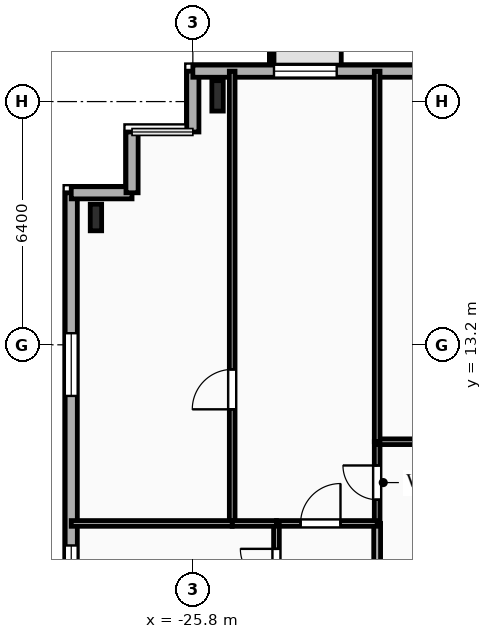
"""IFC4 building model, lengths in metres.
Left out: names, types, materials, properties, quantities, classifications, styles, units other than length and angle.
Written with IfcOpenShell. Run it as: python <this file> out.ifc"""

import sys

from ifc_helpers import new_model, si_unit, direction, frame, frame_2d, origin, origin_2d, place, context, subcontext, project, spatial, rectangle, i_section, extrude, element, fill, save


model = new_model("IFC4")
c1 = context("Model", 3, precision=1e-05, world=origin(), true_north=direction((0.0, 1.0)))
c2 = subcontext(c1, "Body", "Model", "MODEL_VIEW")
j1 = project(units=[si_unit("LENGTHUNIT", "METRE"), si_unit("PLANEANGLEUNIT", "RADIAN")], contexts=[c1])
p1 = place(None, origin())
s1 = spatial("IfcSite", under=j1, at=p1, CompositionType="ELEMENT")
p2 = place(p1, origin())
s2 = spatial("IfcBuilding", under=s1, at=p2, CompositionType="ELEMENT")
p3 = place(p2, frame((0.0, 0.0, 167.85)))
s3 = spatial("IfcBuildingStorey", under=s2, at=p3, CompositionType="ELEMENT", Elevation=167.85)
p4 = place(p3, frame((-25.15, 19.75, 0.0), z_axis=(0.0, 0.0, 1.0), x_axis=(1.0, 0.0, 0.0)))
e1 = element("IfcColumn", 1, at=p4, inside=s3, PredefinedType="COLUMN", context=c2, shape_type="SweptSolid", body=[
    extrude(i_section(OverallWidth=0.3, OverallDepth=0.8, WebThickness=0.018, FlangeThickness=0.033, FilletRadius=0.03, at=origin_2d()), origin(), (0.0, 0.0, 1.0), 3.35),
])
p5 = place(p3, frame((-28.35, 16.55, 0.0), z_axis=(0.0, 0.0, 1.0), x_axis=(1.0, 0.0, 0.0)))
e2 = element("IfcColumn", 2, at=p5, inside=s3, PredefinedType="COLUMN", context=c2, shape_type="SweptSolid", body=[
    extrude(i_section(OverallWidth=0.3, OverallDepth=0.7, WebThickness=0.017, FlangeThickness=0.032, FilletRadius=0.027, at=origin_2d()), origin(), (0.0, 0.0, 1.0), 3.35),
])
p6 = place(p3, frame((-29.0, -12.4, 0.0), z_axis=(0.0, 0.0, 1.0), x_axis=(0.0, 1.0, 0.0)))
e3 = element("IfcWall", 3, at=p6, inside=s3, PredefinedType="SOLIDWALL", context=c2, shape_type="SweptSolid", body=[
    extrude(rectangle(XDim=29.6, YDim=0.32, at=frame_2d((14.8, 0.0))), origin(), (0.0, 0.0, 1.0), 3.04),
])
p7 = place(p6, frame((2.855, 0.0, 0.85)))
e4 = element("IfcOpeningElement", 4, at=p7, cuts=e3, PredefinedType="OPENING", context=c2, shape_type="SweptSolid", body=[
    extrude(rectangle(XDim=1.65, YDim=1.85, at=frame_2d((0.825, 0.925))), frame((0.0, 0.17, 0.0), z_axis=(0.0, -1.0, 0.0), x_axis=(1.0, 0.0, 0.0)), (0.0, 0.0, 1.0), 0.34),
])
p8 = place(p6, frame((9.865, 0.0, 0.85)))
e5 = element("IfcOpeningElement", 5, at=p8, cuts=e3, PredefinedType="OPENING", context=c2, shape_type="SweptSolid", body=[
    extrude(rectangle(XDim=1.95, YDim=1.85, at=frame_2d((0.975, 0.925))), frame((0.0, 0.17, 0.0), z_axis=(0.0, -1.0, 0.0), x_axis=(1.0, 0.0, 0.0)), (0.0, 0.0, 1.0), 0.34),
])
p9 = place(p6, frame((13.08, 0.0, 0.85)))
e6 = element("IfcOpeningElement", 6, at=p9, cuts=e3, PredefinedType="OPENING", context=c2, shape_type="SweptSolid", body=[
    extrude(rectangle(XDim=1.6, YDim=1.85, at=frame_2d((0.8, 0.925))), frame((0.0, 0.17, 0.0), z_axis=(0.0, -1.0, 0.0), x_axis=(1.0, 0.0, 0.0)), (0.0, 0.0, 1.0), 0.34),
])
p10 = place(p6, frame((15.88, 0.0, 0.85)))
e7 = element("IfcOpeningElement", 7, at=p10, cuts=e3, PredefinedType="OPENING", context=c2, shape_type="SweptSolid", body=[
    extrude(rectangle(XDim=1.6, YDim=1.85, at=frame_2d((0.8, 0.925))), frame((0.0, 0.17, 0.0), z_axis=(0.0, -1.0, 0.0), x_axis=(1.0, 0.0, 0.0)), (0.0, 0.0, 1.0), 0.34),
])
p11 = place(p6, frame((18.72, 0.0, 0.85)))
e8 = element("IfcOpeningElement", 8, at=p11, cuts=e3, PredefinedType="OPENING", context=c2, shape_type="SweptSolid", body=[
    extrude(rectangle(XDim=1.6, YDim=1.85, at=frame_2d((0.8, 0.925))), frame((0.0, 0.17, 0.0), z_axis=(0.0, -1.0, 0.0), x_axis=(1.0, 0.0, 0.0)), (0.0, 0.0, 1.0), 0.34),
])
p12 = place(p6, frame((24.255, 0.0, 0.85)))
e9 = element("IfcOpeningElement", 9, at=p12, cuts=e3, PredefinedType="OPENING", context=c2, shape_type="SweptSolid", body=[
    extrude(rectangle(XDim=1.65, YDim=1.85, at=frame_2d((0.825, 0.925))), frame((0.0, 0.17, 0.0), z_axis=(0.0, -1.0, 0.0), x_axis=(1.0, 0.0, 0.0)), (0.0, 0.0, 1.0), 0.34),
])
for number, where, z_axis, x_axis in (
    (10, (-29.0, 17.2, 0.0), (0.0, 0.0, 1.0), (1.0, 0.0, 0.0)),
    (11, (-27.4, 17.2, 0.0), (0.0, 0.0, 1.0), (0.0, 1.0, 0.0)),
):
    element("IfcWall", number, at=place(p3, frame(where, z_axis=z_axis, x_axis=x_axis)), inside=s3, PredefinedType="SOLIDWALL", context=c2, shape_type="SweptSolid", body=[
        extrude(rectangle(XDim=1.6, YDim=0.32, at=frame_2d((0.8, 0.0))), origin(), (0.0, 0.0, 1.0), 3.04),
    ])
p13 = place(p3, frame((-25.8, 18.8, 0.0), z_axis=(0.0, 0.0, 1.0), x_axis=(0.0, 1.0, 0.0)))
e12 = element("IfcWall", 12, at=p13, inside=s3, PredefinedType="SOLIDWALL", context=c2, shape_type="SweptSolid", body=[
    extrude(rectangle(XDim=1.6, YDim=0.32, at=frame_2d((0.8, 0.0))), origin(), (0.0, 0.0, 1.0), 3.04),
])
p14 = place(p3, frame((-25.8, 20.4, 0.0), z_axis=(0.0, 0.0, 1.0), x_axis=(1.0, 0.0, 0.0)))
e13 = element("IfcWall", 13, at=p14, inside=s3, PredefinedType="SOLIDWALL", context=c2, shape_type="SweptSolid", body=[
    extrude(rectangle(XDim=49.6, YDim=0.32, at=frame_2d((24.8, 0.0))), origin(), (0.0, 0.0, 1.0), 3.04),
])
p15 = place(p14, frame((2.135, 0.0, 0.85)))
e14 = element("IfcOpeningElement", 14, at=p15, cuts=e13, PredefinedType="OPENING", context=c2, shape_type="SweptSolid", body=[
    extrude(rectangle(XDim=1.65, YDim=1.85, at=frame_2d((0.825, 0.925))), frame((0.0, 0.17, 0.0), z_axis=(0.0, -1.0, 0.0), x_axis=(1.0, 0.0, 0.0)), (0.0, 0.0, 1.0), 0.34),
])
p16 = place(p14, frame((6.295, 0.0, 0.85)))
e15 = element("IfcOpeningElement", 15, at=p16, cuts=e13, PredefinedType="OPENING", context=c2, shape_type="SweptSolid", body=[
    extrude(rectangle(XDim=1.65, YDim=1.85, at=frame_2d((0.825, 0.925))), frame((0.0, 0.17, 0.0), z_axis=(0.0, -1.0, 0.0), x_axis=(1.0, 0.0, 0.0)), (0.0, 0.0, 1.0), 0.34),
])
p17 = place(p14, frame((10.775, 0.0, 0.85)))
e16 = element("IfcOpeningElement", 16, at=p17, cuts=e13, PredefinedType="OPENING", context=c2, shape_type="SweptSolid", body=[
    extrude(rectangle(XDim=1.65, YDim=1.85, at=frame_2d((0.825, 0.925))), frame((0.0, 0.17, 0.0), z_axis=(0.0, -1.0, 0.0), x_axis=(1.0, 0.0, 0.0)), (0.0, 0.0, 1.0), 0.34),
])
p18 = place(p14, frame((18.44, 0.0, 0.85)))
e17 = element("IfcOpeningElement", 17, at=p18, cuts=e13, PredefinedType="OPENING", context=c2, shape_type="SweptSolid", body=[
    extrude(rectangle(XDim=1.6, YDim=1.85, at=frame_2d((0.8, 0.925))), frame((0.0, 0.17, 0.0), z_axis=(0.0, -1.0, 0.0), x_axis=(1.0, 0.0, 0.0)), (0.0, 0.0, 1.0), 0.34),
])
p19 = place(p14, frame((25.34, 0.0, 0.85)))
e18 = element("IfcOpeningElement", 18, at=p19, cuts=e13, PredefinedType="OPENING", context=c2, shape_type="SweptSolid", body=[
    extrude(rectangle(XDim=2.2, YDim=1.85, at=frame_2d((1.1, 0.925))), frame((0.0, 0.17, 0.0), z_axis=(0.0, -1.0, 0.0), x_axis=(1.0, 0.0, 0.0)), (0.0, 0.0, 1.0), 0.34),
])
p20 = place(p14, frame((33.74, 0.0, 0.85)))
e19 = element("IfcOpeningElement", 19, at=p20, cuts=e13, PredefinedType="OPENING", context=c2, shape_type="SweptSolid", body=[
    extrude(rectangle(XDim=2.2, YDim=1.85, at=frame_2d((1.1, 0.925))), frame((0.0, 0.17, 0.0), z_axis=(0.0, -1.0, 0.0), x_axis=(1.0, 0.0, 0.0)), (0.0, 0.0, 1.0), 0.34),
])
p21 = place(p14, frame((42.095, 0.0, 0.85)))
e20 = element("IfcOpeningElement", 20, at=p21, cuts=e13, PredefinedType="OPENING", context=c2, shape_type="SweptSolid", body=[
    extrude(rectangle(XDim=1.65, YDim=1.85, at=frame_2d((0.825, 0.925))), frame((0.0, 0.17, 0.0), z_axis=(0.0, -1.0, 0.0), x_axis=(1.0, 0.0, 0.0)), (0.0, 0.0, 1.0), 0.34),
])
p22 = place(p14, frame((47.45, 0.0, 0.85)))
e21 = element("IfcOpeningElement", 21, at=p22, cuts=e13, PredefinedType="OPENING", context=c2, shape_type="SweptSolid", body=[
    extrude(rectangle(XDim=1.1, YDim=1.85, at=frame_2d((0.55, 0.925))), frame((0.0, 0.17, 0.0), z_axis=(0.0, -1.0, 0.0), x_axis=(1.0, 0.0, 0.0)), (0.0, 0.0, 1.0), 0.34),
])
p23 = place(p3, frame((-20.95, 8.5, 0.0), z_axis=(0.0, 0.0, 1.0), x_axis=(0.0, 1.0, 0.0)))
e22 = element("IfcWall", 22, at=p23, inside=s3, PredefinedType="PARTITIONING", context=c2, shape_type="SweptSolid", body=[
    extrude(rectangle(XDim=2.15, YDim=0.15, at=frame_2d((1.075, 0.0))), origin(), (0.0, 0.0, 1.0), 3.04),
])
p24 = place(p23, frame((0.625, 0.0, 0.0)))
e23 = element("IfcOpeningElement", 23, at=p24, cuts=e22, PredefinedType="OPENING", context=c2, shape_type="SweptSolid", body=[
    extrude(rectangle(XDim=0.9, YDim=2.1, at=frame_2d((0.45, 1.05))), frame((0.0, 0.085, 0.0), z_axis=(0.0, -1.0, 0.0), x_axis=(1.0, 0.0, 0.0)), (0.0, 0.0, 1.0), 0.17),
])
p25 = place(p3, frame((-20.95, 10.65, 0.0), z_axis=(0.0, 0.0, 1.0), x_axis=(1.0, 0.0, 0.0)))
e24 = element("IfcWall", 24, at=p25, inside=s3, PredefinedType="PARTITIONING", context=c2, shape_type="SweptSolid", body=[
    extrude(rectangle(XDim=4.49, YDim=0.15, at=frame_2d((2.245, 0.0))), origin(), (0.0, 0.0, 1.0), 3.04),
])
p26 = place(p25, frame((2.575, 0.0, 0.0)))
e25 = element("IfcOpeningElement", 25, at=p26, cuts=e24, PredefinedType="OPENING", context=c2, shape_type="SweptSolid", body=[
    extrude(rectangle(XDim=1.05, YDim=2.15, at=frame_2d((0.525, 1.075))), frame((0.0, 0.085, 0.0), z_axis=(0.0, -1.0, 0.0), x_axis=(1.0, 0.0, 0.0)), (0.0, 0.0, 1.0), 0.17),
])
p27 = place(p3, frame((-20.95, -5.6, 0.0), z_axis=(0.0, 0.0, 1.0), x_axis=(0.0, 1.0, 0.0)))
e26 = element("IfcWall", 26, at=p27, inside=s3, PredefinedType="PARTITIONING", context=c2, shape_type="SweptSolid", body=[
    extrude(rectangle(XDim=14.1, YDim=0.18, at=frame_2d((7.05, 0.0))), origin(), (0.0, 0.0, 1.0), 3.04),
])
p28 = place(p27, frame((5.058, 0.0, 0.0)))
e27 = element("IfcOpeningElement", 27, at=p28, cuts=e26, PredefinedType="OPENING", context=c2, shape_type="SweptSolid", body=[
    extrude(rectangle(XDim=1.0, YDim=2.15, at=frame_2d((0.5, 1.075))), frame((0.0, 0.1, 0.0), z_axis=(0.0, -1.0, 0.0), x_axis=(1.0, 0.0, 0.0)), (0.0, 0.0, 1.0), 0.2),
])
p29 = place(p3, frame((-23.6, 8.5, 0.0), z_axis=(0.0, 0.0, 1.0), x_axis=(1.0, 0.0, 0.0)))
e28 = element("IfcWall", 28, at=p29, inside=s3, PredefinedType="PARTITIONING", context=c2, shape_type="SweptSolid", body=[
    extrude(rectangle(XDim=2.65, YDim=0.15, at=frame_2d((1.325, 0.0))), origin(), (0.0, 0.0, 1.0), 3.04),
])
p30 = place(p29, frame((0.635, 0.0, 0.0)))
e29 = element("IfcOpeningElement", 29, at=p30, cuts=e28, PredefinedType="OPENING", context=c2, shape_type="SweptSolid", body=[
    extrude(rectangle(XDim=1.05, YDim=2.15, at=frame_2d((0.525, 1.075))), frame((0.0, 0.085, 0.0), z_axis=(0.0, -1.0, 0.0), x_axis=(1.0, 0.0, 0.0)), (0.0, 0.0, 1.0), 0.17),
])
p31 = place(p3, frame((-23.6, 5.68, 0.0), z_axis=(0.0, 0.0, 1.0), x_axis=(0.0, 1.0, 0.0)))
e30 = element("IfcWall", 30, at=p31, inside=s3, PredefinedType="PARTITIONING", context=c2, shape_type="SweptSolid", body=[
    extrude(rectangle(XDim=2.82, YDim=0.15, at=frame_2d((1.41, 0.0))), origin(), (0.0, 0.0, 1.0), 2.695),
])
p32 = place(p31, frame((1.201, 0.0, 0.0)))
e31 = element("IfcOpeningElement", 31, at=p32, cuts=e30, PredefinedType="OPENING", context=c2, shape_type="SweptSolid", body=[
    extrude(rectangle(XDim=0.95, YDim=2.1, at=frame_2d((0.475, 1.05))), frame((0.0, 0.085, 0.0), z_axis=(0.0, -1.0, 0.0), x_axis=(1.0, 0.0, 0.0)), (0.0, 0.0, 1.0), 0.17),
])
p33 = place(p3, frame((-24.765, 8.5, 0.0), z_axis=(0.0, 0.0, 1.0), x_axis=(0.0, 1.0, 0.0)))
e32 = element("IfcWall", 32, at=p33, inside=s3, PredefinedType="PARTITIONING", context=c2, shape_type="SweptSolid", body=[
    extrude(rectangle(XDim=11.9, YDim=0.15, at=frame_2d((5.95, 0.0))), origin(), (0.0, 0.0, 1.0), 3.04),
])
p34 = place(p33, frame((3.002, 0.0, 0.0)))
e33 = element("IfcOpeningElement", 33, at=p34, cuts=e32, PredefinedType="OPENING", context=c2, shape_type="SweptSolid", body=[
    extrude(rectangle(XDim=1.05, YDim=2.15, at=frame_2d((0.525, 1.075))), frame((0.0, 0.085, 0.0), z_axis=(0.0, -1.0, 0.0), x_axis=(1.0, 0.0, 0.0)), (0.0, 0.0, 1.0), 0.17),
])
p35 = place(p3, frame((-23.6, 8.5, 0.0), z_axis=(0.0, 0.0, 1.0), x_axis=(-1.0, 0.0, 0.0)))
e34 = element("IfcWall", 34, at=p35, inside=s3, PredefinedType="PARTITIONING", context=c2, shape_type="SweptSolid", body=[
    extrude(rectangle(XDim=1.165, YDim=0.15, at=frame_2d((0.583, 0.0))), origin(), (0.0, 0.0, 1.0), 3.04),
])
p36 = place(p3, frame((-20.95, 20.4, 0.0), z_axis=(0.0, 0.0, 1.0), x_axis=(0.0, -1.0, 0.0)))
e35 = element("IfcWall", 35, at=p36, inside=s3, PredefinedType="PARTITIONING", context=c2, shape_type="SweptSolid", body=[
    extrude(rectangle(XDim=9.75, YDim=0.15, at=frame_2d((4.875, 0.0))), origin(), (0.0, 0.0, 1.0), 3.04),
])
p37 = place(p3, frame((-24.765, 8.5, 0.0), z_axis=(0.0, 0.0, 1.0), x_axis=(-1.0, 0.0, 0.0)))
e36 = element("IfcWall", 36, at=p37, inside=s3, PredefinedType="PARTITIONING", context=c2, shape_type="SweptSolid", body=[
    extrude(rectangle(XDim=4.235, YDim=0.15, at=frame_2d((2.118, 0.0))), origin(), (0.0, 0.0, 1.0), 3.04),
])
p38 = place(p11, origin())
e37 = element("IfcWindow", 37, at=p38, inside=s3, PartitioningType="SINGLE_PANEL", PredefinedType="WINDOW", context=c2, shape_type="SweptSolid", body=[
    extrude(rectangle(XDim=1.6, YDim=1.85, at=frame_2d((0.8, 0.925))), frame((0.0, 0.03, 0.0), z_axis=(0.0, -1.0, 0.0), x_axis=(1.0, 0.0, 0.0)), (0.0, 0.0, 1.0), 0.06),
])
fill(e8, e37)
p39 = place(p12, origin())
e38 = element("IfcWindow", 38, at=p39, inside=s3, PartitioningType="SINGLE_PANEL", PredefinedType="WINDOW", context=c2, shape_type="SweptSolid", body=[
    extrude(rectangle(XDim=1.65, YDim=1.85, at=frame_2d((0.825, 0.925))), frame((0.0, 0.03, 0.0), z_axis=(0.0, -1.0, 0.0), x_axis=(1.0, 0.0, 0.0)), (0.0, 0.0, 1.0), 0.06),
])
fill(e9, e38)
p40 = place(p15, origin())
e39 = element("IfcWindow", 39, at=p40, inside=s3, PartitioningType="SINGLE_PANEL", PredefinedType="WINDOW", context=c2, shape_type="SweptSolid", body=[
    extrude(rectangle(XDim=1.65, YDim=1.85, at=frame_2d((0.825, 0.925))), frame((0.0, 0.03, 0.0), z_axis=(0.0, -1.0, 0.0), x_axis=(1.0, 0.0, 0.0)), (0.0, 0.0, 1.0), 0.06),
])
fill(e14, e39)
p41 = place(p24, origin())
e40 = element("IfcDoor", 40, at=p41, inside=s3, OperationType="SINGLE_SWING_RIGHT", PredefinedType="DOOR", context=c2, shape_type="SweptSolid", body=[
    extrude(rectangle(XDim=0.9, YDim=2.1, at=frame_2d((0.45, 1.05))), frame((0.0, 0.025, 0.0), z_axis=(0.0, -1.0, 0.0), x_axis=(1.0, 0.0, 0.0)), (0.0, 0.0, 1.0), 0.05),
])
fill(e23, e40)
p42 = place(p30, origin())
e41 = element("IfcDoor", 41, at=p42, inside=s3, OperationType="SINGLE_SWING_RIGHT", PredefinedType="DOOR", context=c2, shape_type="SweptSolid", body=[
    extrude(rectangle(XDim=1.05, YDim=2.15, at=frame_2d((0.525, 1.075))), frame((0.0, 0.025, 0.0), z_axis=(0.0, -1.0, 0.0), x_axis=(1.0, 0.0, 0.0)), (0.0, 0.0, 1.0), 0.05),
])
fill(e29, e41)
p43 = place(p32, origin())
e42 = element("IfcDoor", 42, at=p43, inside=s3, OperationType="SINGLE_SWING_RIGHT", PredefinedType="DOOR", context=c2, shape_type="SweptSolid", body=[
    extrude(rectangle(XDim=0.95, YDim=2.1, at=frame_2d((0.475, 1.05))), frame((0.0, 0.025, 0.0), z_axis=(0.0, -1.0, 0.0), x_axis=(1.0, 0.0, 0.0)), (0.0, 0.0, 1.0), 0.05),
])
fill(e31, e42)
p44 = place(p34, origin())
e43 = element("IfcDoor", 43, at=p44, inside=s3, OperationType="SINGLE_SWING_LEFT", PredefinedType="DOOR", context=c2, shape_type="SweptSolid", body=[
    extrude(rectangle(XDim=1.05, YDim=2.15, at=frame_2d((0.525, 1.075))), frame((0.0, 0.025, 0.0), z_axis=(0.0, -1.0, 0.0), x_axis=(1.0, 0.0, 0.0)), (0.0, 0.0, 1.0), 0.05),
])
fill(e33, e43)
save(model, sys.argv[1])
